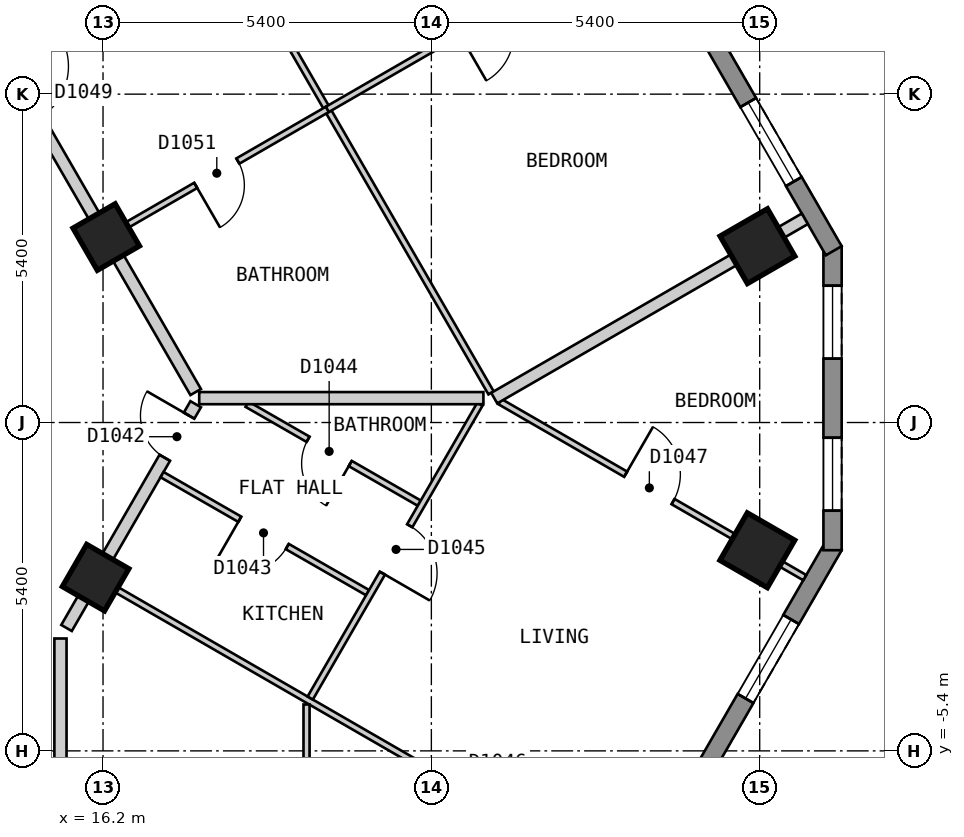
"""IFC4 building model, lengths in metres.
Left out: names, types, materials, properties, quantities, classifications, styles, units other than length and angle.
Written with IfcOpenShell. Run it as: python <this file> out.ifc"""

import sys

from ifc_helpers import new_model, si_unit, direction, frame, frame_2d, origin, origin_2d, place, context, subcontext, project, spatial, polyline, rectangle, outline, extrude, element, fill, save


model = new_model("IFC4")
c1 = context("Model", 3, precision=1e-05, world=origin(), true_north=direction((0.0, 1.0)))
c2 = subcontext(c1, "Body", "Model", "MODEL_VIEW")
j1 = project(units=[si_unit("LENGTHUNIT", "METRE"), si_unit("PLANEANGLEUNIT", "RADIAN")], contexts=[c1])
p1 = place(None, origin())
s1 = spatial("IfcSite", under=j1, at=p1, CompositionType="ELEMENT")
p2 = place(p1, origin())
s2 = spatial("IfcBuilding", under=s1, at=p2, CompositionType="ELEMENT")
p3 = place(p2, frame((0.0, 0.0, 126.6)))
s3 = spatial("IfcBuildingStorey", under=s2, at=p3, CompositionType="ELEMENT", Elevation=126.6)
for number, where, z_axis, x_axis in (
    (1, (26.961, -2.101, 0.0), (0.0, 0.0, 1.0), (0.5, 0.866, 0.0)),
    (2, (26.963, 2.9, 0.0), (0.0, 0.0, 1.0), (-0.5, 0.866, 0.0)),
):
    element("IfcColumn", number, at=place(p3, frame(where, z_axis=z_axis, x_axis=x_axis)), inside=s3, PredefinedType="COLUMN", context=c2, shape_type="SweptSolid", body=[
        extrude(rectangle(XDim=0.9, YDim=0.9, at=origin_2d()), origin(), (0.0, 0.0, 1.0), 3.0),
    ])
for number, where, z_axis, x_axis in (
    (3, (16.078, -2.551, 0.0), (0.0, 0.0, 1.0), (0.5, 0.866, 0.0)),
    (4, (16.253, 3.05, 0.0), (0.0, 0.0, 1.0), (-0.5, 0.866, 0.0)),
):
    element("IfcColumn", number, at=place(p3, frame(where, z_axis=z_axis, x_axis=x_axis)), inside=s3, PredefinedType="COLUMN", context=c2, shape_type="SweptSolid", body=[
        extrude(rectangle(XDim=0.8, YDim=0.8, at=origin_2d()), origin(), (0.0, 0.0, 1.0), 3.0),
    ])
p4 = place(p3, frame((15.862, -23.425, 0.0), z_axis=(0.0, 0.0, 1.0), x_axis=(0.500017503135, 0.866015298109, 0.0)))
e5 = element("IfcWall", 5, at=p4, inside=s3, PredefinedType="SOLIDWALL", context=c2, shape_type="SweptSolid", body=[
    extrude(outline(polyline([(0.0, -0.15), (24.711, -0.15), (24.631, 0.15), (0.08, 0.15), (0.0, -0.15)])), origin(), (0.0, 0.0, 1.0), 2.7),
])
p5 = place(p4, frame((1.4, 0.0, 0.15)))
e6 = element("IfcOpeningElement", 6, at=p5, cuts=e5, PredefinedType="OPENING", context=c2, shape_type="SweptSolid", body=[
    extrude(rectangle(XDim=1.5, YDim=2.1, at=frame_2d((0.75, 1.05))), frame((0.0, 0.16, 0.0), z_axis=(0.0, -1.0, 0.0), x_axis=(1.0, 0.0, 0.0)), (0.0, 0.0, 1.0), 0.32),
])
p6 = place(p4, frame((4.316, 0.0, 0.15)))
e7 = element("IfcOpeningElement", 7, at=p6, cuts=e5, PredefinedType="OPENING", context=c2, shape_type="SweptSolid", body=[
    extrude(rectangle(XDim=1.5, YDim=2.1, at=frame_2d((0.75, 1.05))), frame((0.0, 0.16, 0.0), z_axis=(0.0, -1.0, 0.0), x_axis=(1.0, 0.0, 0.0)), (0.0, 0.0, 1.0), 0.32),
])
p7 = place(p4, frame((7.231, 0.0, 0.15)))
e8 = element("IfcOpeningElement", 8, at=p7, cuts=e5, PredefinedType="OPENING", context=c2, shape_type="SweptSolid", body=[
    extrude(rectangle(XDim=1.5, YDim=2.1, at=frame_2d((0.75, 1.05))), frame((0.0, 0.16, 0.0), z_axis=(0.0, -1.0, 0.0), x_axis=(1.0, 0.0, 0.0)), (0.0, 0.0, 1.0), 0.32),
])
p8 = place(p4, frame((10.147, 0.0, 0.15)))
e9 = element("IfcOpeningElement", 9, at=p8, cuts=e5, PredefinedType="OPENING", context=c2, shape_type="SweptSolid", body=[
    extrude(rectangle(XDim=1.5, YDim=2.1, at=frame_2d((0.75, 1.05))), frame((0.0, 0.16, 0.0), z_axis=(0.0, -1.0, 0.0), x_axis=(1.0, 0.0, 0.0)), (0.0, 0.0, 1.0), 0.32),
])
p9 = place(p4, frame((13.062, 0.0, 0.15)))
e10 = element("IfcOpeningElement", 10, at=p9, cuts=e5, PredefinedType="OPENING", context=c2, shape_type="SweptSolid", body=[
    extrude(rectangle(XDim=1.5, YDim=2.1, at=frame_2d((0.75, 1.05))), frame((0.0, 0.16, 0.0), z_axis=(0.0, -1.0, 0.0), x_axis=(1.0, 0.0, 0.0)), (0.0, 0.0, 1.0), 0.32),
])
p10 = place(p4, frame((15.977, 0.0, 0.15)))
e11 = element("IfcOpeningElement", 11, at=p10, cuts=e5, PredefinedType="OPENING", context=c2, shape_type="SweptSolid", body=[
    extrude(rectangle(XDim=1.5, YDim=2.1, at=frame_2d((0.75, 1.05))), frame((0.0, 0.16, 0.0), z_axis=(0.0, -1.0, 0.0), x_axis=(1.0, 0.0, 0.0)), (0.0, 0.0, 1.0), 0.32),
])
p11 = place(p4, frame((18.893, 0.0, 0.15)))
e12 = element("IfcOpeningElement", 12, at=p11, cuts=e5, PredefinedType="OPENING", context=c2, shape_type="SweptSolid", body=[
    extrude(rectangle(XDim=1.5, YDim=2.1, at=frame_2d((0.75, 1.05))), frame((0.0, 0.16, 0.0), z_axis=(0.0, -1.0, 0.0), x_axis=(1.0, 0.0, 0.0)), (0.0, 0.0, 1.0), 0.32),
])
p12 = place(p4, frame((21.809, 0.0, 0.15)))
e13 = element("IfcOpeningElement", 13, at=p12, cuts=e5, PredefinedType="OPENING", context=c2, shape_type="SweptSolid", body=[
    extrude(rectangle(XDim=1.5, YDim=2.1, at=frame_2d((0.75, 1.05))), frame((0.0, 0.16, 0.0), z_axis=(0.0, -1.0, 0.0), x_axis=(1.0, 0.0, 0.0)), (0.0, 0.0, 1.0), 0.32),
])
p13 = place(p3, frame((28.198, -2.1, 0.0), z_axis=(0.0, 0.0, 1.0), x_axis=(0.0, 1.0, 0.0)))
e14 = element("IfcWall", 14, at=p13, inside=s3, PredefinedType="SOLIDWALL", context=c2, shape_type="SweptSolid", body=[
    extrude(outline(polyline([(0.0, -0.15), (5.0, -0.15), (4.92, 0.15), (0.08, 0.15), (0.0, -0.15)])), origin(), (0.0, 0.0, 1.0), 2.7),
])
p14 = place(p13, frame((0.65, 0.0, 0.15)))
e15 = element("IfcOpeningElement", 15, at=p14, cuts=e14, PredefinedType="OPENING", context=c2, shape_type="SweptSolid", body=[
    extrude(rectangle(XDim=1.2, YDim=2.1, at=frame_2d((0.6, 1.05))), frame((0.0, 0.16, 0.0), z_axis=(0.0, -1.0, 0.0), x_axis=(1.0, 0.0, 0.0)), (0.0, 0.0, 1.0), 0.32),
])
p15 = place(p13, frame((3.15, 0.0, 0.15)))
e16 = element("IfcOpeningElement", 16, at=p15, cuts=e14, PredefinedType="OPENING", context=c2, shape_type="SweptSolid", body=[
    extrude(rectangle(XDim=1.2, YDim=2.1, at=frame_2d((0.6, 1.05))), frame((0.0, 0.16, 0.0), z_axis=(0.0, -1.0, 0.0), x_axis=(1.0, 0.0, 0.0)), (0.0, 0.0, 1.0), 0.32),
])
p16 = place(p3, frame((28.218, 2.825, 0.0), z_axis=(0.0, 0.0, 1.0), x_axis=(-0.500020536353, 0.866013546791, 0.0)))
e17 = element("IfcWall", 17, at=p16, inside=s3, PredefinedType="SOLIDWALL", context=c2, shape_type="SweptSolid", body=[
    extrude(outline(polyline([(0.0, -0.15), (23.325, -0.15), (23.245, 0.15), (0.08, 0.15), (0.0, -0.15)])), origin(), (0.0, 0.0, 1.0), 2.7),
])
p17 = place(p16, frame((1.314, 0.0, 0.15)))
e18 = element("IfcOpeningElement", 18, at=p17, cuts=e17, PredefinedType="OPENING", context=c2, shape_type="SweptSolid", body=[
    extrude(rectangle(XDim=1.5, YDim=2.1, at=frame_2d((0.75, 1.05))), frame((0.0, 0.16, 0.0), z_axis=(0.0, -1.0, 0.0), x_axis=(1.0, 0.0, 0.0)), (0.0, 0.0, 1.0), 0.32),
])
p18 = place(p16, frame((4.056, 0.0, 0.15)))
e19 = element("IfcOpeningElement", 19, at=p18, cuts=e17, PredefinedType="OPENING", context=c2, shape_type="SweptSolid", body=[
    extrude(rectangle(XDim=1.5, YDim=2.1, at=frame_2d((0.75, 1.05))), frame((0.0, 0.16, 0.0), z_axis=(0.0, -1.0, 0.0), x_axis=(1.0, 0.0, 0.0)), (0.0, 0.0, 1.0), 0.32),
])
p19 = place(p16, frame((6.798, 0.0, 0.15)))
e20 = element("IfcOpeningElement", 20, at=p19, cuts=e17, PredefinedType="OPENING", context=c2, shape_type="SweptSolid", body=[
    extrude(rectangle(XDim=1.5, YDim=2.1, at=frame_2d((0.75, 1.05))), frame((0.0, 0.16, 0.0), z_axis=(0.0, -1.0, 0.0), x_axis=(1.0, 0.0, 0.0)), (0.0, 0.0, 1.0), 0.32),
])
p20 = place(p16, frame((9.541, 0.0, 0.15)))
e21 = element("IfcOpeningElement", 21, at=p20, cuts=e17, PredefinedType="OPENING", context=c2, shape_type="SweptSolid", body=[
    extrude(rectangle(XDim=1.5, YDim=2.1, at=frame_2d((0.75, 1.05))), frame((0.0, 0.16, 0.0), z_axis=(0.0, -1.0, 0.0), x_axis=(1.0, 0.0, 0.0)), (0.0, 0.0, 1.0), 0.32),
])
p21 = place(p16, frame((12.284, 0.0, 0.15)))
e22 = element("IfcOpeningElement", 22, at=p21, cuts=e17, PredefinedType="OPENING", context=c2, shape_type="SweptSolid", body=[
    extrude(rectangle(XDim=1.5, YDim=2.1, at=frame_2d((0.75, 1.05))), frame((0.0, 0.16, 0.0), z_axis=(0.0, -1.0, 0.0), x_axis=(1.0, 0.0, 0.0)), (0.0, 0.0, 1.0), 0.32),
])
p22 = place(p16, frame((15.027, 0.0, 0.15)))
e23 = element("IfcOpeningElement", 23, at=p22, cuts=e17, PredefinedType="OPENING", context=c2, shape_type="SweptSolid", body=[
    extrude(rectangle(XDim=1.5, YDim=2.1, at=frame_2d((0.75, 1.05))), frame((0.0, 0.16, 0.0), z_axis=(0.0, -1.0, 0.0), x_axis=(1.0, 0.0, 0.0)), (0.0, 0.0, 1.0), 0.32),
])
p23 = place(p16, frame((17.769, 0.0, 0.15)))
e24 = element("IfcOpeningElement", 24, at=p23, cuts=e17, PredefinedType="OPENING", context=c2, shape_type="SweptSolid", body=[
    extrude(rectangle(XDim=1.5, YDim=2.1, at=frame_2d((0.75, 1.05))), frame((0.0, 0.16, 0.0), z_axis=(0.0, -1.0, 0.0), x_axis=(1.0, 0.0, 0.0)), (0.0, 0.0, 1.0), 0.32),
])
p24 = place(p16, frame((20.511, 0.0, 0.15)))
e25 = element("IfcOpeningElement", 25, at=p24, cuts=e17, PredefinedType="OPENING", context=c2, shape_type="SweptSolid", body=[
    extrude(rectangle(XDim=1.5, YDim=2.1, at=frame_2d((0.75, 1.05))), frame((0.0, 0.16, 0.0), z_axis=(0.0, -1.0, 0.0), x_axis=(1.0, 0.0, 0.0)), (0.0, 0.0, 1.0), 0.32),
])
p25 = place(p3, frame((9.296, 15.1, 0.0), z_axis=(0.0, 0.0, 1.0), x_axis=(0.499974024244, -0.866040400375, 0.0)))
e26 = element("IfcWall", 26, at=p25, inside=s3, PredefinedType="PARTITIONING", context=c2, shape_type="SweptSolid", body=[
    extrude(rectangle(XDim=16.857, YDim=0.2, at=frame_2d((8.429, 0.0))), origin(), (0.0, 0.0, 1.0), 2.7),
])
p26 = place(p25, frame((10.672, 0.0, 0.0)))
e27 = element("IfcOpeningElement", 27, at=p26, cuts=e26, PredefinedType="OPENING", context=c2, shape_type="SweptSolid", body=[
    extrude(rectangle(XDim=1.0, YDim=2.1, at=frame_2d((0.5, 1.05))), frame((0.0, 0.11, 0.0), z_axis=(0.0, -1.0, 0.0), x_axis=(1.0, 0.0, 0.0)), (0.0, 0.0, 1.0), 0.22),
])
p27 = place(p3, frame((15.6, -3.379, 0.0), z_axis=(0.0, 0.0, 1.0), x_axis=(0.499896543382, 0.866085126252, 0.0)))
e28 = element("IfcWall", 28, at=p27, inside=s3, PredefinedType="PARTITIONING", context=c2, shape_type="SweptSolid", body=[
    extrude(rectangle(XDim=4.249, YDim=0.2, at=frame_2d((2.125, 0.0))), origin(), (0.0, 0.0, 1.0), 2.7),
])
p28 = place(p27, frame((3.232, 0.0, 0.0)))
e29 = element("IfcOpeningElement", 29, at=p28, cuts=e28, PredefinedType="OPENING", context=c2, shape_type="SweptSolid", body=[
    extrude(rectangle(XDim=0.8, YDim=2.1, at=frame_2d((0.4, 1.05))), frame((0.0, 0.11, 0.0), z_axis=(0.0, -1.0, 0.0), x_axis=(1.0, 0.0, 0.0)), (0.0, 0.0, 1.0), 0.22),
])
p29 = place(p3, frame((15.5, -21.2, 0.0), z_axis=(0.0, 0.0, 1.0), x_axis=(0.0, 1.0, 0.0)))
e30 = element("IfcWall", 30, at=p29, inside=s3, PredefinedType="PARTITIONING", context=c2, shape_type="SweptSolid", body=[
    extrude(rectangle(XDim=17.648, YDim=0.2, at=frame_2d((8.824, 0.0))), origin(), (0.0, 0.0, 1.0), 2.7),
])
p30 = place(p29, frame((7.575, 0.0, 0.0)))
e31 = element("IfcOpeningElement", 31, at=p30, cuts=e30, PredefinedType="OPENING", context=c2, shape_type="SweptSolid", body=[
    extrude(rectangle(XDim=1.0, YDim=2.1, at=frame_2d((0.5, 1.05))), frame((0.0, 0.11, 0.0), z_axis=(0.0, -1.0, 0.0), x_axis=(1.0, 0.0, 0.0)), (0.0, 0.0, 1.0), 0.22),
])
p31 = place(p3, frame((14.455, 14.563, 0.0), z_axis=(0.0, 0.0, 1.0), x_axis=(0.500009803579, -0.866019743612, 0.0)))
e32 = element("IfcWall", 32, at=p31, inside=s3, PredefinedType="PARTITIONING", context=c2, shape_type="SweptSolid", body=[
    extrude(rectangle(XDim=16.254, YDim=0.1, at=frame_2d((8.127, 0.0))), origin(), (0.0, 0.0, 1.0), 2.7),
])
p32 = place(p31, frame((7.677, 0.0, 0.0)))
e33 = element("IfcOpeningElement", 33, at=p32, cuts=e32, PredefinedType="OPENING", context=c2, shape_type="SweptSolid", body=[
    extrude(rectangle(XDim=0.9, YDim=2.1, at=frame_2d((0.45, 1.05))), frame((0.0, 0.06, 0.0), z_axis=(0.0, -1.0, 0.0), x_axis=(1.0, 0.0, 0.0)), (0.0, 0.0, 1.0), 0.12),
])
p33 = place(p3, frame((16.165, -2.601, 0.0), z_axis=(0.0, 0.0, 1.0), x_axis=(0.866016855193, -0.500014806302, 0.0)))
e34 = element("IfcWall", 34, at=p33, inside=s3, PredefinedType="PARTITIONING", context=c2, shape_type="SweptSolid", body=[
    extrude(rectangle(XDim=10.0, YDim=0.1, at=frame_2d((5.0, 0.0))), origin(), (0.0, 0.0, 1.0), 2.7),
])
p34 = place(p33, frame((6.524, 0.0, 0.0)))
e35 = element("IfcOpeningElement", 35, at=p34, cuts=e34, PredefinedType="OPENING", context=c2, shape_type="SweptSolid", body=[
    extrude(rectangle(XDim=0.9, YDim=2.1, at=frame_2d((0.45, 1.05))), frame((0.0, 0.06, 0.0), z_axis=(0.0, -1.0, 0.0), x_axis=(1.0, 0.0, 0.0)), (0.0, 0.0, 1.0), 0.12),
])
p35 = place(p3, frame((17.171, -0.857, 0.0), z_axis=(0.0, 0.0, 1.0), x_axis=(0.867173455867, -0.49800622229, 0.0)))
e36 = element("IfcWall", 36, at=p35, inside=s3, PredefinedType="PARTITIONING", context=c2, shape_type="SweptSolid", body=[
    extrude(rectangle(XDim=3.898, YDim=0.1, at=frame_2d((1.949, 0.0))), origin(), (0.0, 0.0, 1.0), 2.7),
])
p36 = place(p35, frame((1.474, 0.0, 0.0)))
e37 = element("IfcOpeningElement", 37, at=p36, cuts=e36, PredefinedType="OPENING", context=c2, shape_type="SweptSolid", body=[
    extrude(rectangle(XDim=0.9, YDim=2.1, at=frame_2d((0.45, 1.05))), frame((0.0, 0.06, 0.0), z_axis=(0.0, -1.0, 0.0), x_axis=(1.0, 0.0, 0.0)), (0.0, 0.0, 1.0), 0.12),
])
p37 = place(p3, frame((18.568, 0.301, 0.0), z_axis=(0.0, 0.0, 1.0), x_axis=(0.867155675456, -0.49803718187, 0.0)))
e38 = element("IfcWall", 38, at=p37, inside=s3, PredefinedType="PARTITIONING", context=c2, shape_type="SweptSolid", body=[
    extrude(rectangle(XDim=3.267, YDim=0.1, at=frame_2d((1.633, 0.0))), origin(), (0.0, 0.0, 1.0), 2.7),
])
p38 = place(p37, frame((1.158, 0.0, 0.0)))
e39 = element("IfcOpeningElement", 39, at=p38, cuts=e38, PredefinedType="OPENING", context=c2, shape_type="SweptSolid", body=[
    extrude(rectangle(XDim=0.8, YDim=2.1, at=frame_2d((0.4, 1.05))), frame((0.0, 0.06, 0.0), z_axis=(0.0, -1.0, 0.0), x_axis=(1.0, 0.0, 0.0)), (0.0, 0.0, 1.0), 0.12),
])
p39 = place(p3, frame((22.729, 0.343, 0.0), z_axis=(0.0, 0.0, 1.0), x_axis=(0.865996608848, -0.500049870977, 0.0)))
e40 = element("IfcWall", 40, at=p39, inside=s3, PredefinedType="PARTITIONING", context=c2, shape_type="SweptSolid", body=[
    extrude(rectangle(XDim=5.788, YDim=0.1, at=frame_2d((2.894, 0.0))), origin(), (0.0, 0.0, 1.0), 2.7),
])
p40 = place(p39, frame((2.386, 0.0, 0.0)))
e41 = element("IfcOpeningElement", 41, at=p40, cuts=e40, PredefinedType="OPENING", context=c2, shape_type="SweptSolid", body=[
    extrude(rectangle(XDim=0.9, YDim=2.1, at=frame_2d((0.45, 1.05))), frame((0.0, 0.06, 0.0), z_axis=(0.0, -1.0, 0.0), x_axis=(1.0, 0.0, 0.0)), (0.0, 0.0, 1.0), 0.12),
])
p41 = place(p3, frame((19.608, -4.531, 0.0), z_axis=(0.0, 0.0, 1.0), x_axis=(0.500035555316, 0.86600487494, 0.0)))
e42 = element("IfcWall", 42, at=p41, inside=s3, PredefinedType="PARTITIONING", context=c2, shape_type="SweptSolid", body=[
    extrude(rectangle(XDim=5.58, YDim=0.1, at=frame_2d((2.79, 0.0))), origin(), (0.0, 0.0, 1.0), 2.7),
])
p42 = place(p41, frame((2.372, 0.0, 0.0)))
e43 = element("IfcOpeningElement", 43, at=p42, cuts=e42, PredefinedType="OPENING", context=c2, shape_type="SweptSolid", body=[
    extrude(rectangle(XDim=0.9, YDim=2.1, at=frame_2d((0.45, 1.05))), frame((0.0, 0.06, 0.0), z_axis=(0.0, -1.0, 0.0), x_axis=(1.0, 0.0, 0.0)), (0.0, 0.0, 1.0), 0.12),
])
p43 = place(p3, frame((19.547, -11.171, 0.0), z_axis=(0.0, 0.0, 1.0), x_axis=(0.0, 1.0, 0.0)))
e44 = element("IfcWall", 44, at=p43, inside=s3, PredefinedType="PARTITIONING", context=c2, shape_type="SweptSolid", body=[
    extrude(rectangle(XDim=6.534, YDim=0.1, at=frame_2d((3.267, 0.0))), origin(), (0.0, 0.0, 1.0), 2.7),
])
p44 = place(p43, frame((2.81, 0.0, 0.0)))
e45 = element("IfcOpeningElement", 45, at=p44, cuts=e44, PredefinedType="OPENING", context=c2, shape_type="SweptSolid", body=[
    extrude(rectangle(XDim=0.8, YDim=2.1, at=frame_2d((0.4, 1.05))), frame((0.0, 0.06, 0.0), z_axis=(0.0, -1.0, 0.0), x_axis=(1.0, 0.0, 0.0)), (0.0, 0.0, 1.0), 0.12),
])
p45 = place(p3, frame((16.339, 3.1, 0.0), z_axis=(0.0, 0.0, 1.0), x_axis=(0.866050731258, 0.499956128963, 0.0)))
e46 = element("IfcWall", 46, at=p45, inside=s3, PredefinedType="PARTITIONING", context=c2, shape_type="SweptSolid", body=[
    extrude(rectangle(XDim=4.1, YDim=0.1, at=frame_2d((2.05, 0.0))), origin(), (0.0, 0.0, 1.0), 2.7),
])
p46 = place(p45, frame((1.6, 0.0, 0.0)))
e47 = element("IfcOpeningElement", 47, at=p46, cuts=e46, PredefinedType="OPENING", context=c2, shape_type="SweptSolid", body=[
    extrude(rectangle(XDim=0.8, YDim=2.1, at=frame_2d((0.4, 1.05))), frame((0.0, 0.06, 0.0), z_axis=(0.0, -1.0, 0.0), x_axis=(1.0, 0.0, 0.0)), (0.0, 0.0, 1.0), 0.12),
])
p47 = place(p3, frame((17.782, 0.401, 0.0), z_axis=(0.0, 0.0, 1.0), x_axis=(1.0, 0.0, 0.0)))
e48 = element("IfcWall", 48, at=p47, inside=s3, PredefinedType="PARTITIONING", context=c2, shape_type="SweptSolid", body=[
    extrude(rectangle(XDim=4.674, YDim=0.2, at=frame_2d((2.337, 0.0))), origin(), (0.0, 0.0, 1.0), 2.7),
])
p48 = place(p3, frame((22.634, 0.401, 0.0), z_axis=(0.0, 0.0, 1.0), x_axis=(0.86601325737, 0.500021037617, 0.0)))
e49 = element("IfcWall", 49, at=p48, inside=s3, PredefinedType="PARTITIONING", context=c2, shape_type="SweptSolid", body=[
    extrude(rectangle(XDim=5.898, YDim=0.2, at=frame_2d((2.949, 0.0))), origin(), (0.0, 0.0, 1.0), 2.7),
])
p49 = place(p3, frame((19.89, 5.15, 0.0), z_axis=(0.0, 0.0, 1.0), x_axis=(0.865993310977, 0.500055582255, 0.0)))
e50 = element("IfcWall", 50, at=p49, inside=s3, PredefinedType="PARTITIONING", context=c2, shape_type="SweptSolid", body=[
    extrude(rectangle(XDim=5.9, YDim=0.1, at=frame_2d((2.95, 0.0))), origin(), (0.0, 0.0, 1.0), 2.7),
])
p50 = place(p49, frame((2.5, 0.0, 0.0)))
e51 = element("IfcOpeningElement", 51, at=p50, cuts=e50, PredefinedType="OPENING", context=c2, shape_type="SweptSolid", body=[
    extrude(rectangle(XDim=0.9, YDim=2.1, at=frame_2d((0.45, 1.05))), frame((0.0, 0.06, 0.0), z_axis=(0.0, -1.0, 0.0), x_axis=(1.0, 0.0, 0.0)), (0.0, 0.0, 1.0), 0.12),
])
p51 = place(p12, origin())
e52 = element("IfcWindow", 52, at=p51, inside=s3, PartitioningType="SINGLE_PANEL", PredefinedType="WINDOW", context=c2, shape_type="SweptSolid", body=[
    extrude(rectangle(XDim=1.5, YDim=2.1, at=frame_2d((0.75, 1.05))), frame((0.0, 0.03, 0.0), z_axis=(0.0, -1.0, 0.0), x_axis=(1.0, 0.0, 0.0)), (0.0, 0.0, 1.0), 0.06),
])
fill(e13, e52)
p52 = place(p14, origin())
e53 = element("IfcWindow", 53, at=p52, inside=s3, PartitioningType="SINGLE_PANEL", PredefinedType="WINDOW", context=c2, shape_type="SweptSolid", body=[
    extrude(rectangle(XDim=1.2, YDim=2.1, at=frame_2d((0.6, 1.05))), frame((0.0, 0.03, 0.0), z_axis=(0.0, -1.0, 0.0), x_axis=(1.0, 0.0, 0.0)), (0.0, 0.0, 1.0), 0.06),
])
fill(e15, e53)
p53 = place(p15, origin())
e54 = element("IfcWindow", 54, at=p53, inside=s3, PartitioningType="SINGLE_PANEL", PredefinedType="WINDOW", context=c2, shape_type="SweptSolid", body=[
    extrude(rectangle(XDim=1.2, YDim=2.1, at=frame_2d((0.6, 1.05))), frame((0.0, 0.03, 0.0), z_axis=(0.0, -1.0, 0.0), x_axis=(1.0, 0.0, 0.0)), (0.0, 0.0, 1.0), 0.06),
])
fill(e16, e54)
p54 = place(p17, origin())
e55 = element("IfcWindow", 55, at=p54, inside=s3, PartitioningType="SINGLE_PANEL", PredefinedType="WINDOW", context=c2, shape_type="SweptSolid", body=[
    extrude(rectangle(XDim=1.5, YDim=2.1, at=frame_2d((0.75, 1.05))), frame((0.0, 0.03, 0.0), z_axis=(0.0, -1.0, 0.0), x_axis=(1.0, 0.0, 0.0)), (0.0, 0.0, 1.0), 0.06),
])
fill(e18, e55)
p55 = place(p28, origin())
e56 = element("IfcDoor", 56, at=p55, inside=s3, OperationType="SINGLE_SWING_RIGHT", PredefinedType="DOOR", context=c2, shape_type="SweptSolid", body=[
    extrude(rectangle(XDim=0.8, YDim=2.1, at=frame_2d((0.4, 1.05))), frame((0.0, 0.025, 0.0), z_axis=(0.0, -1.0, 0.0), x_axis=(1.0, 0.0, 0.0)), (0.0, 0.0, 1.0), 0.05),
])
fill(e29, e56)
p56 = place(p36, origin())
e57 = element("IfcDoor", 57, at=p56, inside=s3, OperationType="SINGLE_SWING_LEFT", PredefinedType="DOOR", context=c2, shape_type="SweptSolid", body=[
    extrude(rectangle(XDim=0.9, YDim=2.1, at=frame_2d((0.45, 1.05))), frame((0.0, 0.025, 0.0), z_axis=(0.0, -1.0, 0.0), x_axis=(1.0, 0.0, 0.0)), (0.0, 0.0, 1.0), 0.05),
])
fill(e37, e57)
p57 = place(p38, origin())
e58 = element("IfcDoor", 58, at=p57, inside=s3, OperationType="SINGLE_SWING_RIGHT", PredefinedType="DOOR", context=c2, shape_type="SweptSolid", body=[
    extrude(rectangle(XDim=0.8, YDim=2.1, at=frame_2d((0.4, 1.05))), frame((0.0, 0.025, 0.0), z_axis=(0.0, -1.0, 0.0), x_axis=(1.0, 0.0, 0.0)), (0.0, 0.0, 1.0), 0.05),
])
fill(e39, e58)
p58 = place(p42, origin())
e59 = element("IfcDoor", 59, at=p58, inside=s3, OperationType="SINGLE_SWING_LEFT", PredefinedType="DOOR", context=c2, shape_type="SweptSolid", body=[
    extrude(rectangle(XDim=0.9, YDim=2.1, at=frame_2d((0.45, 1.05))), frame((0.0, 0.025, 0.0), z_axis=(0.0, -1.0, 0.0), x_axis=(1.0, 0.0, 0.0)), (0.0, 0.0, 1.0), 0.05),
])
fill(e43, e59)
p59 = place(p40, origin())
e60 = element("IfcDoor", 60, at=p59, inside=s3, OperationType="SINGLE_SWING_LEFT", PredefinedType="DOOR", context=c2, shape_type="SweptSolid", body=[
    extrude(rectangle(XDim=0.9, YDim=2.1, at=frame_2d((0.45, 1.05))), frame((0.0, 0.025, 0.0), z_axis=(0.0, -1.0, 0.0), x_axis=(1.0, 0.0, 0.0)), (0.0, 0.0, 1.0), 0.05),
])
fill(e41, e60)
p60 = place(p46, origin())
e61 = element("IfcDoor", 61, at=p60, inside=s3, OperationType="SINGLE_SWING_LEFT", PredefinedType="DOOR", context=c2, shape_type="SweptSolid", body=[
    extrude(rectangle(XDim=0.8, YDim=2.1, at=frame_2d((0.4, 1.05))), frame((0.0, 0.025, 0.0), z_axis=(0.0, -1.0, 0.0), x_axis=(1.0, 0.0, 0.0)), (0.0, 0.0, 1.0), 0.05),
])
fill(e47, e61)
save(model, sys.argv[1])
